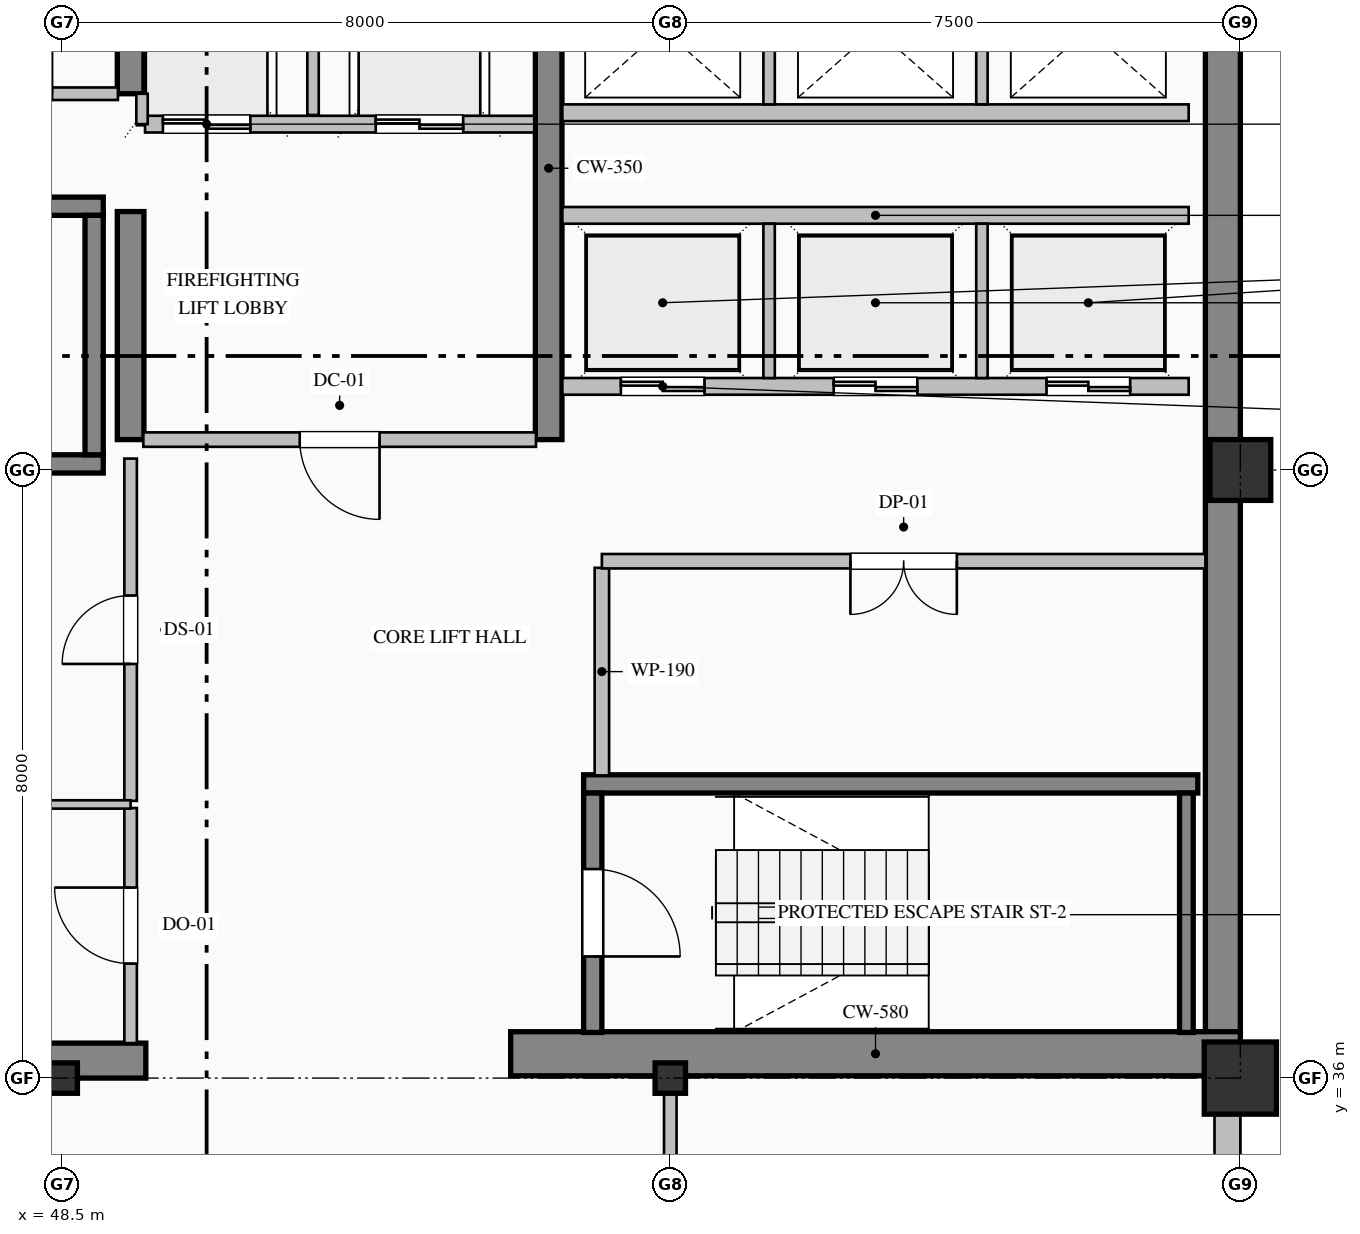
"""IFC4 building model, lengths in metres.
Left out: names, types, materials, properties, quantities, classifications, styles, units other than length and angle.
Written with IfcOpenShell. Run it as: python <this file> out.ifc"""

import sys

from ifc_helpers import new_model, si_unit, direction, frame, frame_2d, origin, origin_2d, place, context, subcontext, project, spatial, rectangle, hollow_rectangle, i_section, extrude, element, fill, save


model = new_model("IFC4")
c1 = context("Model", 3, precision=1e-05, world=origin(), true_north=direction((0.0, 1.0)))
c2 = subcontext(c1, "Body", "Model", "MODEL_VIEW")
j1 = project(units=[si_unit("LENGTHUNIT", "METRE"), si_unit("PLANEANGLEUNIT", "RADIAN")], contexts=[c1])
p1 = place(None, origin())
s1 = spatial("IfcSite", under=j1, at=p1, CompositionType="ELEMENT")
p2 = place(p1, origin())
s2 = spatial("IfcBuilding", under=s1, at=p2, CompositionType="ELEMENT")
p3 = place(p2, frame((0.0, 0.0, 269.8)))
s3 = spatial("IfcBuildingStorey", under=s2, at=p3, CompositionType="ELEMENT", Elevation=269.8)
p4 = place(p3, frame((63.77, 36.32, 0.0), z_axis=(0.0, 0.0, 1.0), x_axis=(0.0, 1.0, 0.0)))
e1 = element("IfcWall", 1, at=p4, inside=s3, PredefinedType="SHEAR", context=c2, shape_type="SweptSolid", body=[
    extrude(rectangle(XDim=15.22, YDim=0.46, at=frame_2d((7.61, 0.0))), origin(), (0.0, 0.0, 1.0), 3.775),
])
p5 = place(p3, frame((40.5, 36.23, 0.0), z_axis=(0.0, 0.0, 1.0), x_axis=(1.0, 0.0, 0.0)))
e2 = element("IfcWall", 2, at=p5, inside=s3, PredefinedType="SHEAR", context=c2, shape_type="SweptSolid", body=[
    extrude(rectangle(XDim=9.1, YDim=0.46, at=frame_2d((4.55, 0.0))), origin(), (0.0, 0.0, 1.0), 3.775),
])
p6 = place(p3, frame((54.4, 36.32, 0.0), z_axis=(0.0, 0.0, 1.0), x_axis=(1.0, 0.0, 0.0)))
e3 = element("IfcWall", 3, at=p6, inside=s3, PredefinedType="SHEAR", context=c2, shape_type="SweptSolid", body=[
    extrude(rectangle(XDim=9.6, YDim=0.58, at=frame_2d((4.8, 0.0))), origin(), (0.0, 0.0, 1.0), 4.0),
])
p7 = place(p3, frame((49.4, 44.4, 0.0), z_axis=(0.0, 0.0, 1.0), x_axis=(0.0, 1.0, 0.0)))
e4 = element("IfcWall", 4, at=p7, inside=s3, PredefinedType="SHEAR", context=c2, shape_type="SweptSolid", body=[
    extrude(rectangle(XDim=3.0, YDim=0.35, at=frame_2d((1.5, 0.0))), origin(), (0.0, 0.0, 1.0), 3.775),
])
p8 = place(p3, frame((49.4, 48.95, 0.0), z_axis=(0.0, 0.0, 1.0), x_axis=(0.0, 1.0, 0.0)))
e5 = element("IfcWall", 5, at=p8, inside=s3, PredefinedType="SHEAR", context=c2, shape_type="SweptSolid", body=[
    extrude(rectangle(XDim=2.59, YDim=0.35, at=frame_2d((1.295, 0.0))), origin(), (0.0, 0.0, 1.0), 3.775),
])
p9 = place(p3, frame((54.9, 44.4, 0.0), z_axis=(0.0, 0.0, 1.0), x_axis=(0.0, 1.0, 0.0)))
e6 = element("IfcWall", 6, at=p9, inside=s3, PredefinedType="SHEAR", context=c2, shape_type="SweptSolid", body=[
    extrude(rectangle(XDim=7.14, YDim=0.35, at=frame_2d((3.57, 0.0))), origin(), (0.0, 0.0, 1.0), 3.775),
])
for number, where, z_axis, x_axis in (
    (7, (48.5, 36.0, 0.0), (0.0, 0.0, 1.0), (1.0, 0.0, 0.0)),
    (8, (56.5, 36.0, 0.0), (0.0, 0.0, 1.0), (1.0, 0.0, 0.0)),
):
    element("IfcColumn", number, at=place(p3, frame(where, z_axis=z_axis, x_axis=x_axis)), inside=s3, PredefinedType="COLUMN", context=c2, shape_type="SweptSolid", body=[
        extrude(i_section(OverallWidth=0.4, OverallDepth=0.4, WebThickness=0.013, FlangeThickness=0.021, FilletRadius=0.022, at=origin_2d()), origin(), (0.0, 0.0, 1.0), 4.0),
    ])
p10 = place(p3, frame((64.0, 36.0, 0.0), z_axis=(0.0, 0.0, 1.0), x_axis=(1.0, 0.0, 0.0)))
e9 = element("IfcColumn", 9, at=p10, inside=s3, PredefinedType="COLUMN", context=c2, shape_type="SweptSolid", body=[
    extrude(hollow_rectangle(XDim=0.95, YDim=0.95, WallThickness=0.036, at=origin_2d()), origin(), (0.0, 0.0, 1.0), 4.0),
])
p11 = place(p3, frame((64.0, 44.0, 0.0), z_axis=(0.0, 0.0, 1.0), x_axis=(1.0, 0.0, 0.0)))
e10 = element("IfcColumn", 10, at=p11, inside=s3, PredefinedType="COLUMN", context=c2, shape_type="SweptSolid", body=[
    extrude(hollow_rectangle(XDim=0.8, YDim=0.8, WallThickness=0.032, at=origin_2d()), origin(), (0.0, 0.0, 1.0), 4.0),
])
p12 = place(p3, frame((63.83, 36.05, 0.0), z_axis=(0.0, 0.0, 1.0), x_axis=(0.0, -1.0, 0.0)))
e11 = element("IfcWall", 11, at=p12, inside=s3, PredefinedType="SOLIDWALL", context=c2, shape_type="SweptSolid", body=[
    extrude(rectangle(XDim=19.55, YDim=0.34, at=frame_2d((9.775, 0.0))), origin(), (0.0, 0.0, 1.0), 3.325),
])
p13 = place(p12, frame((2.85, 0.0, 0.7)))
e12 = element("IfcOpeningElement", 12, at=p13, cuts=e11, PredefinedType="OPENING", context=c2, shape_type="SweptSolid", body=[
    extrude(rectangle(XDim=1.5, YDim=2.4, at=frame_2d((0.75, 1.2))), frame((0.0, 0.18, 0.0), z_axis=(0.0, -1.0, 0.0), x_axis=(1.0, 0.0, 0.0)), (0.0, 0.0, 1.0), 0.36),
])
p14 = place(p12, frame((10.125, 0.0, 0.9)))
e13 = element("IfcOpeningElement", 13, at=p14, cuts=e11, PredefinedType="OPENING", context=c2, shape_type="SweptSolid", body=[
    extrude(rectangle(XDim=1.35, YDim=1.85, at=frame_2d((0.675, 0.925))), frame((0.0, 0.18, 0.0), z_axis=(0.0, -1.0, 0.0), x_axis=(1.0, 0.0, 0.0)), (0.0, 0.0, 1.0), 0.36),
])
p15 = place(p12, frame((13.65, 0.0, 0.7)))
e14 = element("IfcOpeningElement", 14, at=p15, cuts=e11, PredefinedType="OPENING", context=c2, shape_type="SweptSolid", body=[
    extrude(rectangle(XDim=1.5, YDim=2.4, at=frame_2d((0.75, 1.2))), frame((0.0, 0.18, 0.0), z_axis=(0.0, -1.0, 0.0), x_axis=(1.0, 0.0, 0.0)), (0.0, 0.0, 1.0), 0.36),
])
for number, where, z_axis, x_axis in (
    (15, (40.96, 47.47, 0.0), (0.0, 0.0, 1.0), (1.0, 0.0, 0.0)),
    (16, (49.04, 44.08, 0.0), (0.0, 0.0, 1.0), (-1.0, 0.0, 0.0)),
):
    element("IfcWall", number, at=place(p3, frame(where, z_axis=z_axis, x_axis=x_axis)), inside=s3, PredefinedType="SOLIDWALL", context=c2, shape_type="SweptSolid", body=[
        extrude(rectangle(XDim=8.08, YDim=0.24, at=frame_2d((4.04, 0.0))), origin(), (0.0, 0.0, 1.0), 4.0),
    ])
p16 = place(p3, frame((48.92, 44.2, 0.0), z_axis=(0.0, 0.0, 1.0), x_axis=(0.0, 1.0, 0.0)))
e17 = element("IfcWall", 17, at=p16, inside=s3, PredefinedType="SOLIDWALL", context=c2, shape_type="SweptSolid", body=[
    extrude(rectangle(XDim=3.15, YDim=0.24, at=frame_2d((1.575, 0.0))), origin(), (0.0, 0.0, 1.0), 4.0),
])
p17 = place(p3, frame((55.36, 39.87, 0.0), z_axis=(0.0, 0.0, 1.0), x_axis=(1.0, 0.0, 0.0)))
e18 = element("IfcWall", 18, at=p17, inside=s3, PredefinedType="SOLIDWALL", context=c2, shape_type="SweptSolid", body=[
    extrude(rectangle(XDim=8.08, YDim=0.24, at=frame_2d((4.04, 0.0))), origin(), (0.0, 0.0, 1.0), 4.0),
])
p18 = place(p3, frame((55.48, 39.75, 0.0), z_axis=(0.0, 0.0, 1.0), x_axis=(0.0, -1.0, 0.0)))
e19 = element("IfcWall", 19, at=p18, inside=s3, PredefinedType="SOLIDWALL", context=c2, shape_type="SweptSolid", body=[
    extrude(rectangle(XDim=3.15, YDim=0.24, at=frame_2d((1.575, 0.0))), origin(), (0.0, 0.0, 1.0), 4.0),
])
p19 = place(p18, frame((1.0, 0.0, 0.0)))
e20 = element("IfcOpeningElement", 20, at=p19, cuts=e19, PredefinedType="OPENING", context=c2, shape_type="SweptSolid", body=[
    extrude(rectangle(XDim=1.15, YDim=2.2, at=frame_2d((0.575, 1.1))), frame((0.0, 0.13, 0.0), z_axis=(0.0, -1.0, 0.0), x_axis=(1.0, 0.0, 0.0)), (0.0, 0.0, 1.0), 0.26),
])
p20 = place(p3, frame((63.29, 36.6, 0.0), z_axis=(0.0, 0.0, 1.0), x_axis=(0.0, 1.0, 0.0)))
e21 = element("IfcWall", 21, at=p20, inside=s3, PredefinedType="SOLIDWALL", context=c2, shape_type="SweptSolid", body=[
    extrude(rectangle(XDim=3.15, YDim=0.18, at=frame_2d((1.575, 0.0))), origin(), (0.0, 0.0, 1.0), 4.0),
])
p21 = place(p3, frame((54.71, 48.55, 0.0), z_axis=(0.0, 0.0, 1.0), x_axis=(-1.0, 0.0, 0.0)))
e22 = element("IfcWall", 22, at=p21, inside=s3, PredefinedType="PARTITIONING", context=c2, shape_type="SweptSolid", body=[
    extrude(rectangle(XDim=5.12, YDim=0.22, at=frame_2d((2.56, 0.0))), origin(), (0.0, 0.0, 1.0), 3.775),
])
p22 = place(p21, frame((3.735, 0.0, 0.0)))
e23 = element("IfcOpeningElement", 23, at=p22, cuts=e22, PredefinedType="OPENING", context=c2, shape_type="SweptSolid", body=[
    extrude(rectangle(XDim=1.15, YDim=2.2, at=frame_2d((0.575, 1.1))), frame((0.0, 0.12, 0.0), z_axis=(0.0, -1.0, 0.0), x_axis=(1.0, 0.0, 0.0)), (0.0, 0.0, 1.0), 0.24),
])
p23 = place(p21, frame((0.935, 0.0, 0.0)))
e24 = element("IfcOpeningElement", 24, at=p23, cuts=e22, PredefinedType="OPENING", context=c2, shape_type="SweptSolid", body=[
    extrude(rectangle(XDim=1.15, YDim=2.2, at=frame_2d((0.575, 1.1))), frame((0.0, 0.12, 0.0), z_axis=(0.0, -1.0, 0.0), x_axis=(1.0, 0.0, 0.0)), (0.0, 0.0, 1.0), 0.24),
])
p24 = place(p3, frame((51.8, 48.67, 0.0), z_axis=(0.0, 0.0, 1.0), x_axis=(0.0, 1.0, 0.0)))
e25 = element("IfcWall", 25, at=p24, inside=s3, PredefinedType="PARTITIONING", context=c2, shape_type="SweptSolid", body=[
    extrude(rectangle(XDim=2.87, YDim=0.15, at=frame_2d((1.435, 0.0))), origin(), (0.0, 0.0, 1.0), 3.775),
])
p25 = place(p3, frame((49.55, 48.55, 0.0), z_axis=(0.0, 0.0, 1.0), x_axis=(0.0, 1.0, 0.0)))
e26 = element("IfcWall", 26, at=p25, inside=s3, PredefinedType="PARTITIONING", context=c2, shape_type="SweptSolid", body=[
    extrude(rectangle(XDim=0.4, YDim=0.15, at=frame_2d((0.2, 0.0))), origin(), (0.0, 0.0, 1.0), 3.775),
])
p26 = place(p3, frame((63.32, 45.1, 0.0), z_axis=(0.0, 0.0, 1.0), x_axis=(-1.0, 0.0, 0.0)))
e27 = element("IfcWall", 27, at=p26, inside=s3, PredefinedType="PARTITIONING", context=c2, shape_type="SweptSolid", body=[
    extrude(rectangle(XDim=8.24, YDim=0.22, at=frame_2d((4.12, 0.0))), origin(), (0.0, 0.0, 1.0), 3.775),
])
p27 = place(p26, frame((6.37, 0.0, 0.0)))
e28 = element("IfcOpeningElement", 28, at=p27, cuts=e27, PredefinedType="OPENING", context=c2, shape_type="SweptSolid", body=[
    extrude(rectangle(XDim=1.1, YDim=2.2, at=frame_2d((0.55, 1.1))), frame((0.0, 0.12, 0.0), z_axis=(0.0, -1.0, 0.0), x_axis=(1.0, 0.0, 0.0)), (0.0, 0.0, 1.0), 0.24),
])
p28 = place(p26, frame((3.57, 0.0, 0.0)))
e29 = element("IfcOpeningElement", 29, at=p28, cuts=e27, PredefinedType="OPENING", context=c2, shape_type="SweptSolid", body=[
    extrude(rectangle(XDim=1.1, YDim=2.2, at=frame_2d((0.55, 1.1))), frame((0.0, 0.12, 0.0), z_axis=(0.0, -1.0, 0.0), x_axis=(1.0, 0.0, 0.0)), (0.0, 0.0, 1.0), 0.24),
])
p29 = place(p26, frame((0.77, 0.0, 0.0)))
e30 = element("IfcOpeningElement", 30, at=p29, cuts=e27, PredefinedType="OPENING", context=c2, shape_type="SweptSolid", body=[
    extrude(rectangle(XDim=1.1, YDim=2.2, at=frame_2d((0.55, 1.1))), frame((0.0, 0.12, 0.0), z_axis=(0.0, -1.0, 0.0), x_axis=(1.0, 0.0, 0.0)), (0.0, 0.0, 1.0), 0.24),
])
p30 = place(p3, frame((55.08, 47.35, 0.0), z_axis=(0.0, 0.0, 1.0), x_axis=(1.0, 0.0, 0.0)))
e31 = element("IfcWall", 31, at=p30, inside=s3, PredefinedType="PARTITIONING", context=c2, shape_type="SweptSolid", body=[
    extrude(rectangle(XDim=8.24, YDim=0.22, at=frame_2d((4.12, 0.0))), origin(), (0.0, 0.0, 1.0), 3.775),
])
for number, where, z_axis, x_axis in (
    (32, (57.8, 45.21, 0.0), (0.0, 0.0, 1.0), (0.0, 1.0, 0.0)),
    (33, (60.6, 45.21, 0.0), (0.0, 0.0, 1.0), (0.0, 1.0, 0.0)),
):
    element("IfcWall", number, at=place(p3, frame(where, z_axis=z_axis, x_axis=x_axis)), inside=s3, PredefinedType="PARTITIONING", context=c2, shape_type="SweptSolid", body=[
        extrude(rectangle(XDim=2.03, YDim=0.15, at=frame_2d((1.015, 0.0))), origin(), (0.0, 0.0, 1.0), 3.775),
    ])
p31 = place(p3, frame((63.32, 48.7, 0.0), z_axis=(0.0, 0.0, 1.0), x_axis=(-1.0, 0.0, 0.0)))
e34 = element("IfcWall", 34, at=p31, inside=s3, PredefinedType="PARTITIONING", context=c2, shape_type="SweptSolid", body=[
    extrude(rectangle(XDim=8.24, YDim=0.22, at=frame_2d((4.12, 0.0))), origin(), (0.0, 0.0, 1.0), 3.775),
])
for number, where, z_axis, x_axis in (
    (35, (57.8, 48.81, 0.0), (0.0, 0.0, 1.0), (0.0, 1.0, 0.0)),
    (36, (60.6, 48.81, 0.0), (0.0, 0.0, 1.0), (0.0, 1.0, 0.0)),
):
    element("IfcWall", number, at=place(p3, frame(where, z_axis=z_axis, x_axis=x_axis)), inside=s3, PredefinedType="PARTITIONING", context=c2, shape_type="SweptSolid", body=[
        extrude(rectangle(XDim=2.73, YDim=0.15, at=frame_2d((1.365, 0.0))), origin(), (0.0, 0.0, 1.0), 3.775),
    ])
p32 = place(p3, frame((46.6, 48.95, 0.0), z_axis=(0.0, 0.0, 1.0), x_axis=(1.0, 0.0, 0.0)))
e37 = element("IfcWall", 37, at=p32, inside=s3, PredefinedType="PARTITIONING", context=c2, shape_type="SweptSolid", body=[
    extrude(rectangle(XDim=2.633, YDim=0.165, at=frame_2d((1.316, 0.0))), origin(), (0.0, 0.0, 1.0), 3.775),
])
p33 = place(p32, frame((0.866, 0.0, 0.0)))
e38 = element("IfcOpeningElement", 38, at=p33, cuts=e37, PredefinedType="OPENING", context=c2, shape_type="SweptSolid", body=[
    extrude(rectangle(XDim=0.9, YDim=2.15, at=frame_2d((0.45, 1.075))), frame((0.0, 0.093, 0.0), z_axis=(0.0, -1.0, 0.0), x_axis=(1.0, 0.0, 0.0)), (0.0, 0.0, 1.0), 0.185),
])
p34 = place(p3, frame((54.733, 44.4, 0.0), z_axis=(0.0, 0.0, 1.0), x_axis=(-1.0, 0.0, 0.0)))
e39 = element("IfcWall", 39, at=p34, inside=s3, PredefinedType="PARTITIONING", context=c2, shape_type="SweptSolid", body=[
    extrude(rectangle(XDim=5.166, YDim=0.19, at=frame_2d((2.583, 0.0))), origin(), (0.0, 0.0, 1.0), 3.775),
])
p35 = place(p34, frame((2.058, 0.0, 0.0)))
e40 = element("IfcOpeningElement", 40, at=p35, cuts=e39, PredefinedType="OPENING", context=c2, shape_type="SweptSolid", body=[
    extrude(rectangle(XDim=1.05, YDim=2.15, at=frame_2d((0.525, 1.075))), frame((0.0, 0.105, 0.0), z_axis=(0.0, -1.0, 0.0), x_axis=(1.0, 0.0, 0.0)), (0.0, 0.0, 1.0), 0.21),
])
p36 = place(p3, frame((49.4, 36.46, 0.0), z_axis=(0.0, 0.0, 1.0), x_axis=(0.0, 1.0, 0.0)))
e41 = element("IfcWall", 41, at=p36, inside=s3, PredefinedType="PARTITIONING", context=c2, shape_type="SweptSolid", body=[
    extrude(rectangle(XDim=3.093, YDim=0.165, at=frame_2d((1.546, 0.0))), origin(), (0.0, 0.0, 1.0), 3.017),
])
p37 = place(p36, frame((1.046, 0.0, 0.0)))
e42 = element("IfcOpeningElement", 42, at=p37, cuts=e41, PredefinedType="OPENING", context=c2, shape_type="SweptSolid", body=[
    extrude(rectangle(XDim=1.0, YDim=2.15, at=frame_2d((0.5, 1.075))), frame((0.0, 0.093, 0.0), z_axis=(0.0, -1.0, 0.0), x_axis=(1.0, 0.0, 0.0)), (0.0, 0.0, 1.0), 0.185),
])
p38 = place(p3, frame((49.4, 39.647, 0.0), z_axis=(0.0, 0.0, 1.0), x_axis=(0.0, 1.0, 0.0)))
e43 = element("IfcWall", 43, at=p38, inside=s3, PredefinedType="PARTITIONING", context=c2, shape_type="SweptSolid", body=[
    extrude(rectangle(XDim=4.503, YDim=0.165, at=frame_2d((2.251, 0.0))), origin(), (0.0, 0.0, 1.0), 3.017),
])
p39 = place(p38, frame((1.802, 0.0, 0.0)))
e44 = element("IfcOpeningElement", 44, at=p39, cuts=e43, PredefinedType="OPENING", context=c2, shape_type="SweptSolid", body=[
    extrude(rectangle(XDim=0.9, YDim=2.15, at=frame_2d((0.45, 1.075))), frame((0.0, 0.093, 0.0), z_axis=(0.0, -1.0, 0.0), x_axis=(1.0, 0.0, 0.0)), (0.0, 0.0, 1.0), 0.185),
])
p40 = place(p3, frame((55.6, 42.713, 0.0), z_axis=(0.0, 0.0, 1.0), x_axis=(0.0, -1.0, 0.0)))
e45 = element("IfcWall", 45, at=p40, inside=s3, PredefinedType="PARTITIONING", context=c2, shape_type="SweptSolid", body=[
    extrude(rectangle(XDim=2.731, YDim=0.19, at=frame_2d((1.365, 0.0))), origin(), (0.0, 0.0, 1.0), 3.775),
])
p41 = place(p3, frame((40.96, 39.6, 0.0), z_axis=(0.0, 0.0, 1.0), x_axis=(1.0, 0.0, 0.0)))
e46 = element("IfcWall", 46, at=p41, inside=s3, PredefinedType="MOVABLE", context=c2, shape_type="SweptSolid", body=[
    extrude(rectangle(XDim=8.44, YDim=0.11, at=frame_2d((4.22, 0.0))), origin(), (0.0, 0.0, 1.0), 3.775),
])
p42 = place(p3, frame((63.54, 42.8, 0.0), z_axis=(0.0, 0.0, 1.0), x_axis=(-1.0, 0.0, 0.0)))
e47 = element("IfcWall", 47, at=p42, inside=s3, PredefinedType="PARTITIONING", context=c2, shape_type="SweptSolid", body=[
    extrude(rectangle(XDim=7.94, YDim=0.19, at=frame_2d((3.97, 0.0))), origin(), (0.0, 0.0, 1.0), 3.775),
])
p43 = place(p42, frame((3.27, 0.0, 0.0)))
e48 = element("IfcOpeningElement", 48, at=p43, cuts=e47, PredefinedType="OPENING", context=c2, shape_type="SweptSolid", body=[
    extrude(rectangle(XDim=1.4, YDim=2.25, at=frame_2d((0.7, 1.125))), frame((0.0, 0.105, 0.0), z_axis=(0.0, -1.0, 0.0), x_axis=(1.0, 0.0, 0.0)), (0.0, 0.0, 1.0), 0.21),
])
p44 = place(p3, frame((56.5, 36.0, 0.0), z_axis=(0.0, 0.0, 1.0), x_axis=(0.0, -1.0, 0.0)))
e49 = element("IfcWall", 49, at=p44, inside=s3, PredefinedType="PARTITIONING", context=c2, shape_type="SweptSolid", body=[
    extrude(rectangle(XDim=5.525, YDim=0.165, at=frame_2d((2.763, 0.0))), origin(), (0.0, 0.0, 1.0), 3.179),
])
p45 = place(p19, origin())
e50 = element("IfcDoor", 50, at=p45, inside=s3, OperationType="SINGLE_SWING_RIGHT", PredefinedType="DOOR", context=c2, shape_type="SweptSolid", body=[
    extrude(rectangle(XDim=1.15, YDim=2.2, at=frame_2d((0.575, 1.1))), frame((0.0, 0.025, 0.0), z_axis=(0.0, -1.0, 0.0), x_axis=(1.0, 0.0, 0.0)), (0.0, 0.0, 1.0), 0.05),
])
fill(e20, e50)
p46 = place(p22, origin())
e51 = element("IfcDoor", 51, at=p46, inside=s3, OperationType="DOUBLE_DOOR_SLIDING", PredefinedType="DOOR", context=c2, shape_type="SweptSolid", body=[
    extrude(rectangle(XDim=1.15, YDim=2.2, at=frame_2d((0.575, 1.1))), frame((0.0, 0.025, 0.0), z_axis=(0.0, -1.0, 0.0), x_axis=(1.0, 0.0, 0.0)), (0.0, 0.0, 1.0), 0.05),
])
fill(e23, e51)
p47 = place(p23, origin())
e52 = element("IfcDoor", 52, at=p47, inside=s3, OperationType="DOUBLE_DOOR_SLIDING", PredefinedType="DOOR", context=c2, shape_type="SweptSolid", body=[
    extrude(rectangle(XDim=1.15, YDim=2.2, at=frame_2d((0.575, 1.1))), frame((0.0, 0.025, 0.0), z_axis=(0.0, -1.0, 0.0), x_axis=(1.0, 0.0, 0.0)), (0.0, 0.0, 1.0), 0.05),
])
fill(e24, e52)
p48 = place(p27, origin())
e53 = element("IfcDoor", 53, at=p48, inside=s3, OperationType="DOUBLE_DOOR_SLIDING", PredefinedType="DOOR", context=c2, shape_type="SweptSolid", body=[
    extrude(rectangle(XDim=1.1, YDim=2.2, at=frame_2d((0.55, 1.1))), frame((0.0, 0.025, 0.0), z_axis=(0.0, -1.0, 0.0), x_axis=(1.0, 0.0, 0.0)), (0.0, 0.0, 1.0), 0.05),
])
fill(e28, e53)
p49 = place(p28, origin())
e54 = element("IfcDoor", 54, at=p49, inside=s3, OperationType="DOUBLE_DOOR_SLIDING", PredefinedType="DOOR", context=c2, shape_type="SweptSolid", body=[
    extrude(rectangle(XDim=1.1, YDim=2.2, at=frame_2d((0.55, 1.1))), frame((0.0, 0.025, 0.0), z_axis=(0.0, -1.0, 0.0), x_axis=(1.0, 0.0, 0.0)), (0.0, 0.0, 1.0), 0.05),
])
fill(e29, e54)
p50 = place(p29, origin())
e55 = element("IfcDoor", 55, at=p50, inside=s3, OperationType="DOUBLE_DOOR_SLIDING", PredefinedType="DOOR", context=c2, shape_type="SweptSolid", body=[
    extrude(rectangle(XDim=1.1, YDim=2.2, at=frame_2d((0.55, 1.1))), frame((0.0, 0.025, 0.0), z_axis=(0.0, -1.0, 0.0), x_axis=(1.0, 0.0, 0.0)), (0.0, 0.0, 1.0), 0.05),
])
fill(e30, e55)
p51 = place(p35, origin())
e56 = element("IfcDoor", 56, at=p51, inside=s3, OperationType="SINGLE_SWING_LEFT", PredefinedType="DOOR", context=c2, shape_type="SweptSolid", body=[
    extrude(rectangle(XDim=1.05, YDim=2.15, at=frame_2d((0.525, 1.075))), frame((0.0, 0.025, 0.0), z_axis=(0.0, -1.0, 0.0), x_axis=(1.0, 0.0, 0.0)), (0.0, 0.0, 1.0), 0.05),
])
fill(e40, e56)
p52 = place(p37, origin())
e57 = element("IfcDoor", 57, at=p52, inside=s3, OperationType="SINGLE_SWING_RIGHT", PredefinedType="DOOR", context=c2, shape_type="SweptSolid", body=[
    extrude(rectangle(XDim=1.0, YDim=2.15, at=frame_2d((0.5, 1.075))), frame((0.0, 0.025, 0.0), z_axis=(0.0, -1.0, 0.0), x_axis=(1.0, 0.0, 0.0)), (0.0, 0.0, 1.0), 0.05),
])
fill(e42, e57)
p53 = place(p39, origin())
e58 = element("IfcDoor", 58, at=p53, inside=s3, OperationType="SINGLE_SWING_LEFT", PredefinedType="DOOR", context=c2, shape_type="SweptSolid", body=[
    extrude(rectangle(XDim=0.9, YDim=2.15, at=frame_2d((0.45, 1.075))), frame((0.0, 0.025, 0.0), z_axis=(0.0, -1.0, 0.0), x_axis=(1.0, 0.0, 0.0)), (0.0, 0.0, 1.0), 0.05),
])
fill(e44, e58)
p54 = place(p43, origin())
e59 = element("IfcDoor", 59, at=p54, inside=s3, OperationType="DOUBLE_DOOR_SINGLE_SWING", PredefinedType="DOOR", context=c2, shape_type="SweptSolid", body=[
    extrude(rectangle(XDim=1.4, YDim=2.25, at=frame_2d((0.7, 1.125))), frame((0.0, 0.025, 0.0), z_axis=(0.0, -1.0, 0.0), x_axis=(1.0, 0.0, 0.0)), (0.0, 0.0, 1.0), 0.05),
])
fill(e48, e59)
save(model, sys.argv[1])
